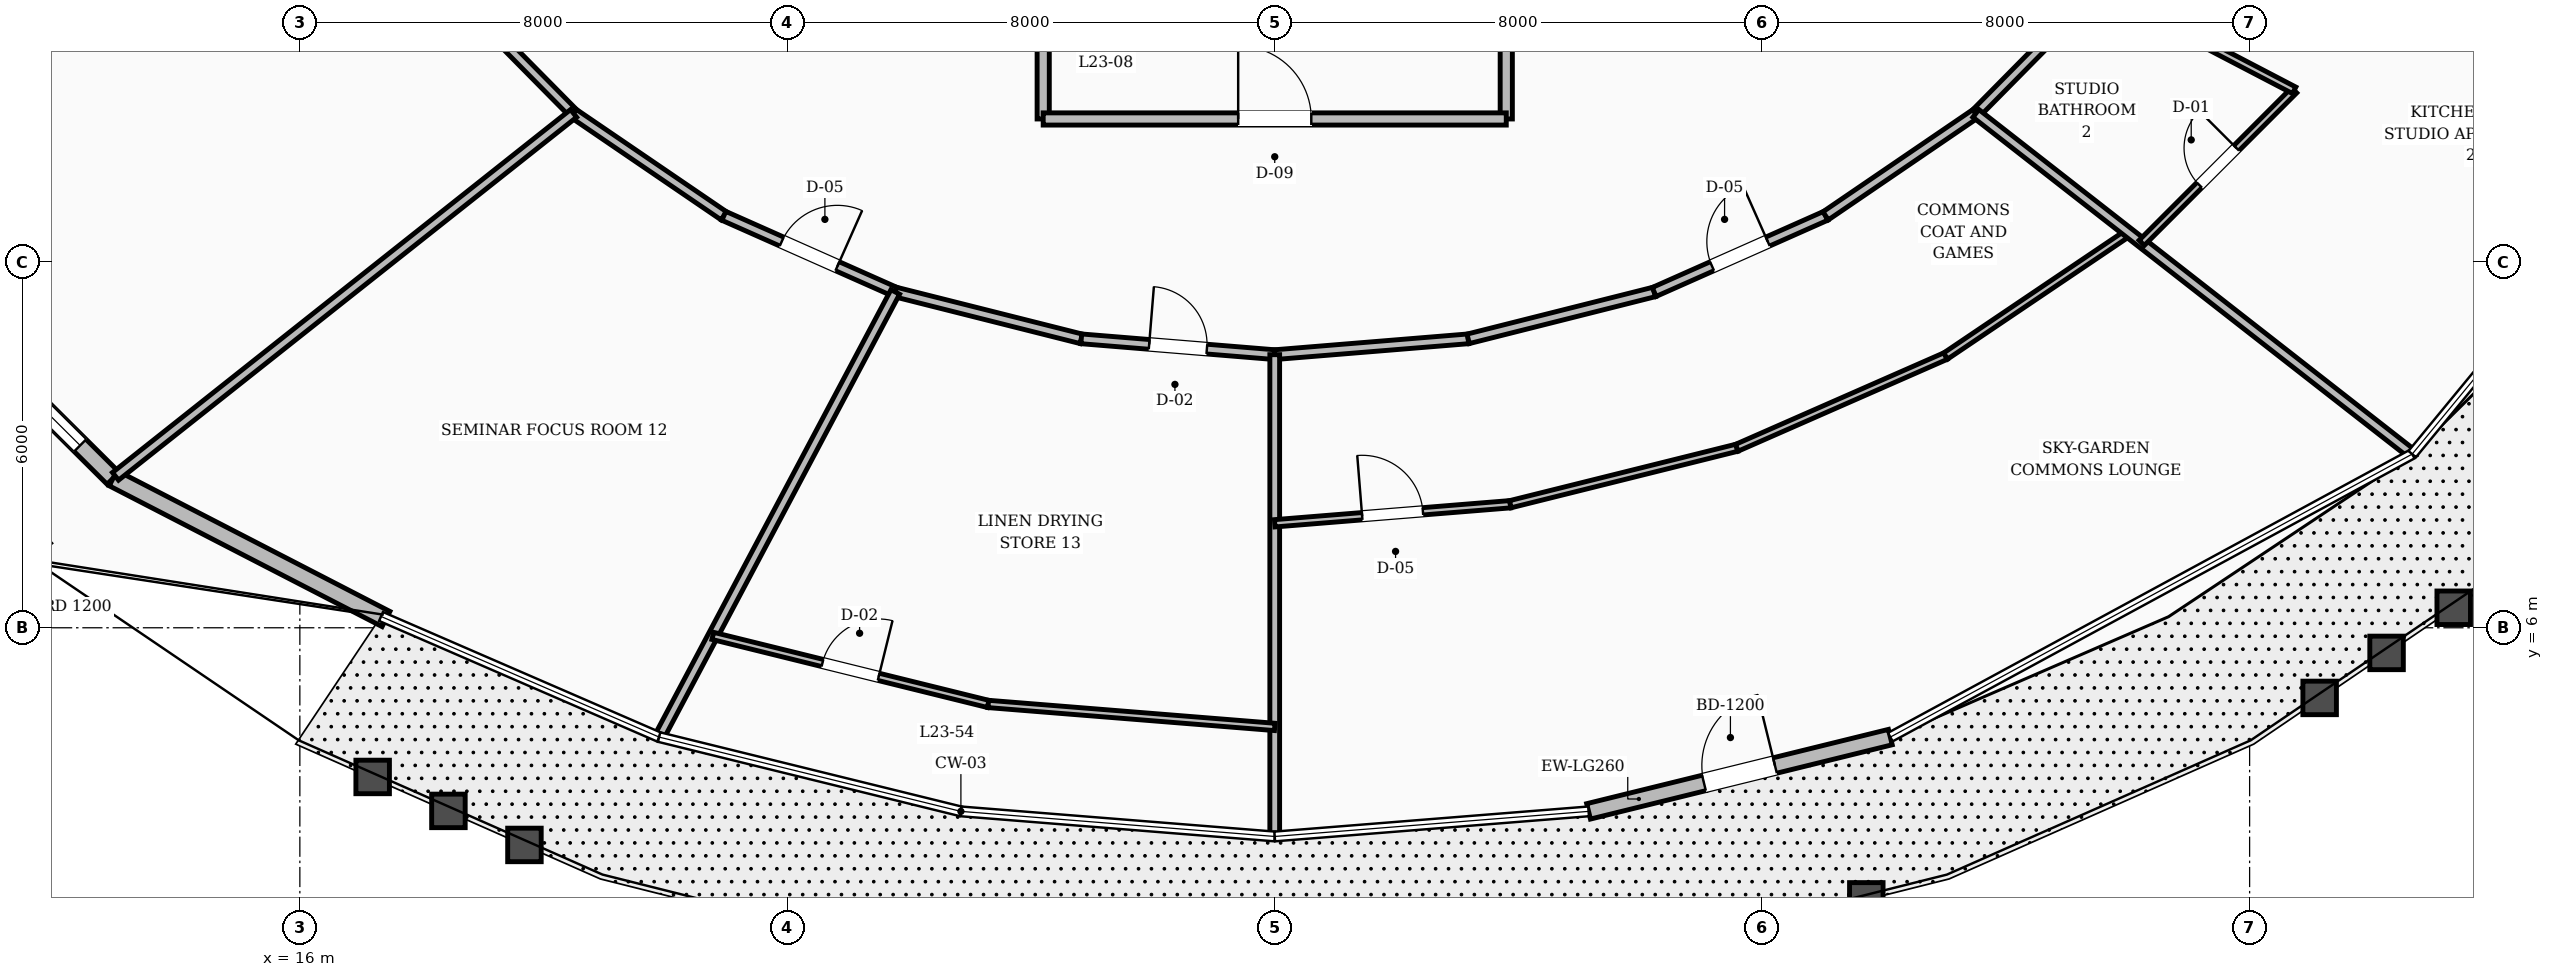
"""IFC4 building model, lengths in metres.
Left out: names, types, materials, properties, quantities, classifications, styles, units other than length and angle.
Written with IfcOpenShell. Run it as: python <this file> out.ifc"""

import sys

from ifc_helpers import new_model, si_unit, direction, frame, frame_2d, origin, place, context, subcontext, project, spatial, rectangle, extrude, element, fill, save


model = new_model("IFC4")
c1 = context("Model", 3, precision=1e-05, world=origin(), true_north=direction((0.0, 1.0)))
c2 = subcontext(c1, "Body", "Model", "MODEL_VIEW")
j1 = project(units=[si_unit("LENGTHUNIT", "METRE"), si_unit("PLANEANGLEUNIT", "RADIAN")], contexts=[c1])
p1 = place(None, origin())
s1 = spatial("IfcSite", under=j1, at=p1, CompositionType="ELEMENT")
p2 = place(p1, origin())
s2 = spatial("IfcBuilding", under=s1, at=p2, CompositionType="ELEMENT")
p3 = place(p2, frame((0.0, 0.0, 91.6)))
s3 = spatial("IfcBuildingStorey", under=s2, at=p3, CompositionType="ELEMENT", Elevation=91.6)
p4 = place(p3, frame((9.582, 11.786, 0.0), z_axis=(0.0, 0.0, 1.0), x_axis=(0.709375776042, -0.704830482006, 0.0)))
e1 = element("IfcWall", 1, at=p4, inside=s3, PredefinedType="STANDARD", context=c2, shape_type="SweptSolid", body=[
    extrude(rectangle(XDim=4.727, YDim=0.28, at=frame_2d((2.363, 0.0))), origin(), (0.0, 0.0, 1.0), 2.71),
])
p5 = place(p4, frame((0.763, 0.0, 0.8)))
e2 = element("IfcOpeningElement", 2, at=p5, cuts=e1, PredefinedType="OPENING", context=c2, shape_type="SweptSolid", body=[
    extrude(rectangle(XDim=3.2, YDim=1.65, at=frame_2d((1.6, 0.825))), frame((0.0, 0.15, 0.0), z_axis=(0.0, -1.0, 0.0), x_axis=(1.0, 0.0, 0.0)), (0.0, 0.0, 1.0), 0.3),
])
p6 = place(p3, frame((12.935, 8.454, 0.0), z_axis=(0.0, 0.0, 1.0), x_axis=(0.888677335441, -0.458533088745, 0.0)))
e3 = element("IfcWall", 3, at=p6, inside=s3, PredefinedType="STANDARD", context=c2, shape_type="SweptSolid", body=[
    extrude(rectangle(XDim=5.04, YDim=0.28, at=frame_2d((2.52, 0.0))), origin(), (0.0, 0.0, 1.0), 2.71),
])
p7 = place(p3, frame((37.151, 2.987, 0.0), z_axis=(0.0, 0.0, 1.0), x_axis=(0.971022910957, 0.23898641467, 0.0)))
e4 = element("IfcWall", 4, at=p7, inside=s3, PredefinedType="STANDARD", context=c2, shape_type="SweptSolid", body=[
    extrude(rectangle(XDim=5.101, YDim=0.26, at=frame_2d((2.55, 0.0))), origin(), (0.0, 0.0, 1.0), 2.71),
])
p8 = place(p7, frame((1.95, 0.0, 0.0)))
e5 = element("IfcOpeningElement", 5, at=p8, cuts=e4, PredefinedType="OPENING", context=c2, shape_type="SweptSolid", body=[
    extrude(rectangle(XDim=1.2, YDim=2.15, at=frame_2d((0.6, 1.075))), frame((0.0, 0.14, 0.0), z_axis=(0.0, -1.0, 0.0), x_axis=(1.0, 0.0, 0.0)), (0.0, 0.0, 1.0), 0.28),
])
for number, where, z_axis, x_axis in (
    (6, (28.2, 14.35, 0.0), (0.0, 0.0, 1.0), (0.0, 1.0, 0.0)),
    (7, (35.8, 14.35, 0.0), (0.0, 0.0, 1.0), (0.0, 1.0, 0.0)),
):
    element("IfcWall", number, at=place(p3, frame(where, z_axis=z_axis, x_axis=x_axis)), inside=s3, PredefinedType="SOLIDWALL", context=c2, shape_type="SweptSolid", body=[
        extrude(rectangle(XDim=2.2, YDim=0.2, at=frame_2d((1.1, 0.0))), origin(), (0.0, 0.0, 1.0), 2.71),
    ])
p9 = place(p3, frame((28.2, 14.35, 0.0), z_axis=(0.0, 0.0, 1.0), x_axis=(1.0, 0.0, 0.0)))
e8 = element("IfcWall", 8, at=p9, inside=s3, PredefinedType="SOLIDWALL", context=c2, shape_type="SweptSolid", body=[
    extrude(rectangle(XDim=7.6, YDim=0.2, at=frame_2d((3.8, 0.0))), origin(), (0.0, 0.0, 1.0), 2.71),
])
p10 = place(p9, frame((3.2, 0.0, 0.0)))
e9 = element("IfcOpeningElement", 9, at=p10, cuts=e8, PredefinedType="OPENING", context=c2, shape_type="SweptSolid", body=[
    extrude(rectangle(XDim=1.2, YDim=2.1, at=frame_2d((0.6, 1.05))), frame((0.0, 0.11, 0.0), z_axis=(0.0, -1.0, 0.0), x_axis=(1.0, 0.0, 0.0)), (0.0, 0.0, 1.0), 0.22),
])
p11 = place(p3, frame((18.469, 16.49, 0.0), z_axis=(0.0, 0.0, 1.0), x_axis=(0.702811997, -0.711375636969, 0.0)))
e10 = element("IfcWall", 10, at=p11, inside=s3, PredefinedType="SOLIDWALL", context=c2, shape_type="SweptSolid", body=[
    extrude(rectangle(XDim=2.879, YDim=0.16, at=frame_2d((1.44, 0.0))), origin(), (0.0, 0.0, 1.0), 2.71),
])
p12 = place(p3, frame((20.492, 14.441, 0.0), z_axis=(0.0, 0.0, 1.0), x_axis=(0.826293096206, -0.56324037423, 0.0)))
e11 = element("IfcWall", 11, at=p12, inside=s3, PredefinedType="SOLIDWALL", context=c2, shape_type="SweptSolid", body=[
    extrude(rectangle(XDim=2.985, YDim=0.16, at=frame_2d((1.492, 0.0))), origin(), (0.0, 0.0, 1.0), 2.71),
])
p13 = place(p3, frame((22.959, 12.76, 0.0), z_axis=(0.0, 0.0, 1.0), x_axis=(0.913952123493, -0.405822024984, 0.0)))
e12 = element("IfcWall", 12, at=p13, inside=s3, PredefinedType="SOLIDWALL", context=c2, shape_type="SweptSolid", body=[
    extrude(rectangle(XDim=3.078, YDim=0.16, at=frame_2d((1.539, 0.0))), origin(), (0.0, 0.0, 1.0), 2.71),
])
p14 = place(p13, frame((1.039, 0.0, 0.0)))
e13 = element("IfcOpeningElement", 13, at=p14, cuts=e12, PredefinedType="OPENING", context=c2, shape_type="SweptSolid", body=[
    extrude(rectangle(XDim=1.0, YDim=2.1, at=frame_2d((0.5, 1.05))), frame((0.0, 0.09, 0.0), z_axis=(0.0, -1.0, 0.0), x_axis=(1.0, 0.0, 0.0)), (0.0, 0.0, 1.0), 0.18),
])
p15 = place(p3, frame((25.772, 11.511, 0.0), z_axis=(0.0, 0.0, 1.0), x_axis=(0.969689238064, -0.244341526521, 0.0)))
e14 = element("IfcWall", 14, at=p15, inside=s3, PredefinedType="SOLIDWALL", context=c2, shape_type="SweptSolid", body=[
    extrude(rectangle(XDim=3.148, YDim=0.16, at=frame_2d((1.574, 0.0))), origin(), (0.0, 0.0, 1.0), 2.71),
])
p16 = place(p3, frame((28.825, 10.742, 0.0), z_axis=(0.0, 0.0, 1.0), x_axis=(0.996669377538, -0.081548463373, 0.0)))
e15 = element("IfcWall", 15, at=p16, inside=s3, PredefinedType="SOLIDWALL", context=c2, shape_type="SweptSolid", body=[
    extrude(rectangle(XDim=3.185, YDim=0.16, at=frame_2d((1.593, 0.0))), origin(), (0.0, 0.0, 1.0), 2.71),
])
p17 = place(p16, frame((1.118, 0.0, 0.0)))
e16 = element("IfcOpeningElement", 16, at=p17, cuts=e15, PredefinedType="OPENING", context=c2, shape_type="SweptSolid", body=[
    extrude(rectangle(XDim=0.95, YDim=2.1, at=frame_2d((0.475, 1.05))), frame((0.0, 0.09, 0.0), z_axis=(0.0, -1.0, 0.0), x_axis=(1.0, 0.0, 0.0)), (0.0, 0.0, 1.0), 0.18),
])
p18 = place(p3, frame((32.0, 10.482, 0.0), z_axis=(0.0, 0.0, 1.0), x_axis=(0.996669377538, 0.081548463373, 0.0)))
e17 = element("IfcWall", 17, at=p18, inside=s3, PredefinedType="SOLIDWALL", context=c2, shape_type="SweptSolid", body=[
    extrude(rectangle(XDim=3.185, YDim=0.16, at=frame_2d((1.593, 0.0))), origin(), (0.0, 0.0, 1.0), 2.71),
])
p19 = place(p3, frame((35.175, 10.742, 0.0), z_axis=(0.0, 0.0, 1.0), x_axis=(0.969689238064, 0.244341526521, 0.0)))
e18 = element("IfcWall", 18, at=p19, inside=s3, PredefinedType="SOLIDWALL", context=c2, shape_type="SweptSolid", body=[
    extrude(rectangle(XDim=3.148, YDim=0.16, at=frame_2d((1.574, 0.0))), origin(), (0.0, 0.0, 1.0), 2.71),
])
p20 = place(p3, frame((38.228, 11.511, 0.0), z_axis=(0.0, 0.0, 1.0), x_axis=(0.913952123493, 0.405822024984, 0.0)))
e19 = element("IfcWall", 19, at=p20, inside=s3, PredefinedType="SOLIDWALL", context=c2, shape_type="SweptSolid", body=[
    extrude(rectangle(XDim=3.078, YDim=0.16, at=frame_2d((1.539, 0.0))), origin(), (0.0, 0.0, 1.0), 2.71),
])
p21 = place(p20, frame((1.039, 0.0, 0.0)))
e20 = element("IfcOpeningElement", 20, at=p21, cuts=e19, PredefinedType="OPENING", context=c2, shape_type="SweptSolid", body=[
    extrude(rectangle(XDim=1.0, YDim=2.1, at=frame_2d((0.5, 1.05))), frame((0.0, 0.09, 0.0), z_axis=(0.0, -1.0, 0.0), x_axis=(1.0, 0.0, 0.0)), (0.0, 0.0, 1.0), 0.18),
])
p22 = place(p3, frame((41.041, 12.76, 0.0), z_axis=(0.0, 0.0, 1.0), x_axis=(0.826293096206, 0.56324037423, 0.0)))
e21 = element("IfcWall", 21, at=p22, inside=s3, PredefinedType="SOLIDWALL", context=c2, shape_type="SweptSolid", body=[
    extrude(rectangle(XDim=2.985, YDim=0.16, at=frame_2d((1.492, 0.0))), origin(), (0.0, 0.0, 1.0), 2.71),
])
p23 = place(p3, frame((43.508, 14.441, 0.0), z_axis=(0.0, 0.0, 1.0), x_axis=(0.702811997, 0.711375636969, 0.0)))
e22 = element("IfcWall", 22, at=p23, inside=s3, PredefinedType="SOLIDWALL", context=c2, shape_type="SweptSolid", body=[
    extrude(rectangle(XDim=2.879, YDim=0.16, at=frame_2d((1.44, 0.0))), origin(), (0.0, 0.0, 1.0), 2.71),
])
p24 = place(p3, frame((32.0, 10.482, 0.0), z_axis=(0.0, 0.0, 1.0), x_axis=(0.0, -1.0, 0.0)))
e23 = element("IfcWall", 23, at=p24, inside=s3, PredefinedType="SOLIDWALL", context=c2, shape_type="SweptSolid", body=[
    extrude(rectangle(XDim=7.857, YDim=0.16, at=frame_2d((3.928, 0.0))), origin(), (0.0, 0.0, 1.0), 2.71),
])
p25 = place(p3, frame((32.0, 7.715, 0.0), z_axis=(0.0, 0.0, 1.0), x_axis=(0.996744649743, 0.080623217549, 0.0)))
e24 = element("IfcWall", 24, at=p25, inside=s3, PredefinedType="PARTITIONING", context=c2, shape_type="SweptSolid", body=[
    extrude(rectangle(XDim=3.879, YDim=0.12, at=frame_2d((1.939, 0.0))), origin(), (0.0, 0.0, 1.0), 2.71),
])
p26 = place(p25, frame((1.439, 0.0, 0.0)))
e25 = element("IfcOpeningElement", 25, at=p26, cuts=e24, PredefinedType="OPENING", context=c2, shape_type="SweptSolid", body=[
    extrude(rectangle(XDim=1.0, YDim=2.1, at=frame_2d((0.5, 1.05))), frame((0.0, 0.07, 0.0), z_axis=(0.0, -1.0, 0.0), x_axis=(1.0, 0.0, 0.0)), (0.0, 0.0, 1.0), 0.14),
])
p27 = place(p3, frame((35.866, 8.027, 0.0), z_axis=(0.0, 0.0, 1.0), x_axis=(0.970307194653, 0.241875893808, 0.0)))
e26 = element("IfcWall", 26, at=p27, inside=s3, PredefinedType="PARTITIONING", context=c2, shape_type="SweptSolid", body=[
    extrude(rectangle(XDim=3.832, YDim=0.12, at=frame_2d((1.916, 0.0))), origin(), (0.0, 0.0, 1.0), 2.71),
])
p28 = place(p3, frame((39.584, 8.954, 0.0), z_axis=(0.0, 0.0, 1.0), x_axis=(0.915554398316, 0.402194161723, 0.0)))
e27 = element("IfcWall", 27, at=p28, inside=s3, PredefinedType="PARTITIONING", context=c2, shape_type="SweptSolid", body=[
    extrude(rectangle(XDim=3.742, YDim=0.12, at=frame_2d((1.871, 0.0))), origin(), (0.0, 0.0, 1.0), 2.71),
])
p29 = place(p3, frame((43.01, 10.459, 0.0), z_axis=(0.0, 0.0, 1.0), x_axis=(0.829125166248, 0.559063018536, 0.0)))
e28 = element("IfcWall", 28, at=p29, inside=s3, PredefinedType="PARTITIONING", context=c2, shape_type="SweptSolid", body=[
    extrude(rectangle(XDim=3.622, YDim=0.12, at=frame_2d((1.811, 0.0))), origin(), (0.0, 0.0, 1.0), 2.71),
])
p30 = place(p3, frame((43.508, 14.441, 0.0), z_axis=(0.0, 0.0, 1.0), x_axis=(0.788218918979, -0.615394942914, 0.0)))
e29 = element("IfcWall", 29, at=p30, inside=s3, PredefinedType="SOLIDWALL", context=c2, shape_type="SweptSolid", body=[
    extrude(rectangle(XDim=9.035, YDim=0.16, at=frame_2d((4.518, 0.0))), origin(), (0.0, 0.0, 1.0), 2.71),
])
p31 = place(p3, frame((46.229, 12.317, 0.0), z_axis=(0.0, 0.0, 1.0), x_axis=(0.7068998534, 0.707313648436, 0.0)))
e30 = element("IfcWall", 30, at=p31, inside=s3, PredefinedType="PARTITIONING", context=c2, shape_type="SweptSolid", body=[
    extrude(rectangle(XDim=3.54, YDim=0.12, at=frame_2d((1.77, 0.0))), origin(), (0.0, 0.0, 1.0), 2.71),
])
p32 = place(p31, frame((1.34, 0.0, 0.0)))
e31 = element("IfcOpeningElement", 31, at=p32, cuts=e30, PredefinedType="OPENING", context=c2, shape_type="SweptSolid", body=[
    extrude(rectangle(XDim=0.86, YDim=2.1, at=frame_2d((0.43, 1.05))), frame((0.0, 0.07, 0.0), z_axis=(0.0, -1.0, 0.0), x_axis=(1.0, 0.0, 0.0)), (0.0, 0.0, 1.0), 0.14),
])
p33 = place(p3, frame((45.531, 16.49, 0.0), z_axis=(0.0, 0.0, 1.0), x_axis=(0.886624645958, -0.462489715756, 0.0)))
e32 = element("IfcWall", 32, at=p33, inside=s3, PredefinedType="PARTITIONING", context=c2, shape_type="SweptSolid", body=[
    extrude(rectangle(XDim=3.609, YDim=0.12, at=frame_2d((1.805, 0.0))), origin(), (0.0, 0.0, 1.0), 2.71),
])
p34 = place(p3, frame((20.492, 14.441, 0.0), z_axis=(0.0, 0.0, 1.0), x_axis=(-0.783820213827, -0.620987819846, 0.0)))
e33 = element("IfcWall", 33, at=p34, inside=s3, PredefinedType="SOLIDWALL", context=c2, shape_type="SweptSolid", body=[
    extrude(rectangle(XDim=9.591, YDim=0.16, at=frame_2d((4.796, 0.0))), origin(), (0.0, 0.0, 1.0), 2.71),
])
p35 = place(p3, frame((25.772, 11.511, 0.0), z_axis=(0.0, 0.0, 1.0), x_axis=(-0.468670871714, -0.88337286239, 0.0)))
e34 = element("IfcWall", 34, at=p35, inside=s3, PredefinedType="SOLIDWALL", context=c2, shape_type="SweptSolid", body=[
    extrude(rectangle(XDim=8.22, YDim=0.16, at=frame_2d((4.11, 0.0))), origin(), (0.0, 0.0, 1.0), 2.71),
])
p36 = place(p3, frame((22.778, 5.867, 0.0), z_axis=(0.0, 0.0, 1.0), x_axis=(0.970811050134, -0.239845585612, 0.0)))
e35 = element("IfcWall", 35, at=p36, inside=s3, PredefinedType="PARTITIONING", context=c2, shape_type="SweptSolid", body=[
    extrude(rectangle(XDim=4.657, YDim=0.12, at=frame_2d((2.329, 0.0))), origin(), (0.0, 0.0, 1.0), 2.71),
])
p37 = place(p36, frame((1.853, 0.0, 0.0)))
e36 = element("IfcOpeningElement", 36, at=p37, cuts=e35, PredefinedType="OPENING", context=c2, shape_type="SweptSolid", body=[
    extrude(rectangle(XDim=0.95, YDim=2.1, at=frame_2d((0.475, 1.05))), frame((0.0, 0.07, 0.0), z_axis=(0.0, -1.0, 0.0), x_axis=(1.0, 0.0, 0.0)), (0.0, 0.0, 1.0), 0.14),
])
p38 = place(p3, frame((27.299, 4.75, 0.0), z_axis=(0.0, 0.0, 1.0), x_axis=(0.99679698314, -0.079973585655, 0.0)))
e37 = element("IfcWall", 37, at=p38, inside=s3, PredefinedType="PARTITIONING", context=c2, shape_type="SweptSolid", body=[
    extrude(rectangle(XDim=4.717, YDim=0.12, at=frame_2d((2.358, 0.0))), origin(), (0.0, 0.0, 1.0), 2.71),
])
p39 = place(p5, origin())
e38 = element("IfcWindow", 38, at=p39, inside=s3, PartitioningType="SINGLE_PANEL", PredefinedType="WINDOW", context=c2, shape_type="SweptSolid", body=[
    extrude(rectangle(XDim=3.2, YDim=1.65, at=frame_2d((1.6, 0.825))), frame((0.0, 0.03, 0.0), z_axis=(0.0, -1.0, 0.0), x_axis=(1.0, 0.0, 0.0)), (0.0, 0.0, 1.0), 0.06),
])
fill(e2, e38)
p40 = place(p8, origin())
e39 = element("IfcDoor", 39, at=p40, inside=s3, OperationType="SINGLE_SWING_RIGHT", PredefinedType="DOOR", context=c2, shape_type="SweptSolid", body=[
    extrude(rectangle(XDim=1.2, YDim=2.15, at=frame_2d((0.6, 1.075))), frame((0.0, 0.025, 0.0), z_axis=(0.0, -1.0, 0.0), x_axis=(1.0, 0.0, 0.0)), (0.0, 0.0, 1.0), 0.05),
])
fill(e5, e39)
p41 = place(p10, origin())
e40 = element("IfcDoor", 40, at=p41, inside=s3, OperationType="SINGLE_SWING_LEFT", PredefinedType="DOOR", context=c2, shape_type="SweptSolid", body=[
    extrude(rectangle(XDim=1.2, YDim=2.1, at=frame_2d((0.6, 1.05))), frame((0.0, 0.025, 0.0), z_axis=(0.0, -1.0, 0.0), x_axis=(1.0, 0.0, 0.0)), (0.0, 0.0, 1.0), 0.05),
])
fill(e9, e40)
p42 = place(p21, origin())
e41 = element("IfcDoor", 41, at=p42, inside=s3, OperationType="SINGLE_SWING_RIGHT", PredefinedType="DOOR", context=c2, shape_type="SweptSolid", body=[
    extrude(rectangle(XDim=1.0, YDim=2.1, at=frame_2d((0.5, 1.05))), frame((0.0, 0.025, 0.0), z_axis=(0.0, -1.0, 0.0), x_axis=(1.0, 0.0, 0.0)), (0.0, 0.0, 1.0), 0.05),
])
fill(e20, e41)
p43 = place(p26, origin())
e42 = element("IfcDoor", 42, at=p43, inside=s3, OperationType="SINGLE_SWING_LEFT", PredefinedType="DOOR", context=c2, shape_type="SweptSolid", body=[
    extrude(rectangle(XDim=1.0, YDim=2.1, at=frame_2d((0.5, 1.05))), frame((0.0, 0.025, 0.0), z_axis=(0.0, -1.0, 0.0), x_axis=(1.0, 0.0, 0.0)), (0.0, 0.0, 1.0), 0.05),
])
fill(e25, e42)
p44 = place(p32, origin())
e43 = element("IfcDoor", 43, at=p44, inside=s3, OperationType="SINGLE_SWING_RIGHT", PredefinedType="DOOR", context=c2, shape_type="SweptSolid", body=[
    extrude(rectangle(XDim=0.86, YDim=2.1, at=frame_2d((0.43, 1.05))), frame((0.0, 0.025, 0.0), z_axis=(0.0, -1.0, 0.0), x_axis=(1.0, 0.0, 0.0)), (0.0, 0.0, 1.0), 0.05),
])
fill(e31, e43)
p45 = place(p14, origin())
e44 = element("IfcDoor", 44, at=p45, inside=s3, OperationType="SINGLE_SWING_RIGHT", PredefinedType="DOOR", context=c2, shape_type="SweptSolid", body=[
    extrude(rectangle(XDim=1.0, YDim=2.1, at=frame_2d((0.5, 1.05))), frame((0.0, 0.025, 0.0), z_axis=(0.0, -1.0, 0.0), x_axis=(1.0, 0.0, 0.0)), (0.0, 0.0, 1.0), 0.05),
])
fill(e13, e44)
p46 = place(p17, origin())
e45 = element("IfcDoor", 45, at=p46, inside=s3, OperationType="SINGLE_SWING_LEFT", PredefinedType="DOOR", context=c2, shape_type="SweptSolid", body=[
    extrude(rectangle(XDim=0.95, YDim=2.1, at=frame_2d((0.475, 1.05))), frame((0.0, 0.025, 0.0), z_axis=(0.0, -1.0, 0.0), x_axis=(1.0, 0.0, 0.0)), (0.0, 0.0, 1.0), 0.05),
])
fill(e16, e45)
p47 = place(p37, origin())
e46 = element("IfcDoor", 46, at=p47, inside=s3, OperationType="SINGLE_SWING_RIGHT", PredefinedType="DOOR", context=c2, shape_type="SweptSolid", body=[
    extrude(rectangle(XDim=0.95, YDim=2.1, at=frame_2d((0.475, 1.05))), frame((0.0, 0.025, 0.0), z_axis=(0.0, -1.0, 0.0), x_axis=(1.0, 0.0, 0.0)), (0.0, 0.0, 1.0), 0.05),
])
fill(e36, e46)
save(model, sys.argv[1])
